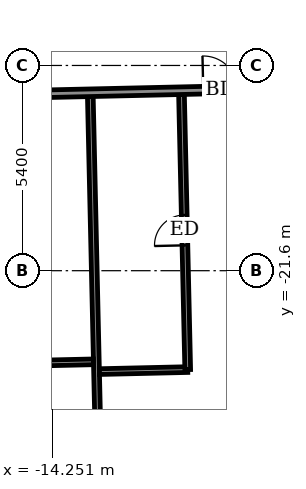
"""IFC4 building model, lengths in metres.
Left out: names, types, materials, properties, quantities, classifications, styles, units other than length and angle.
Written with IfcOpenShell. Run it as: python <this file> out.ifc"""

import sys

from ifc_helpers import new_model, si_unit, direction, frame, frame_2d, origin, place, context, subcontext, project, spatial, rectangle, extrude, element, fill, save


model = new_model("IFC4")
c1 = context("Model", 3, precision=1e-05, world=origin(), true_north=direction((0.0, 1.0)))
c2 = subcontext(c1, "Body", "Model", "MODEL_VIEW")
j1 = project(units=[si_unit("LENGTHUNIT", "METRE"), si_unit("PLANEANGLEUNIT", "RADIAN")], contexts=[c1])
p1 = place(None, origin())
s1 = spatial("IfcSite", under=j1, at=p1, CompositionType="ELEMENT")
p2 = place(p1, origin())
s2 = spatial("IfcBuilding", under=s1, at=p2, CompositionType="ELEMENT")
p3 = place(p2, frame((0.0, 0.0, 41.3)))
s3 = spatial("IfcBuildingStorey", under=s2, at=p3, CompositionType="ELEMENT", Elevation=41.3)
p4 = place(p3, frame((-12.973, -29.415, 0.0), z_axis=(0.0, 0.0, 1.0), x_axis=(-0.022661475803, 0.999743195783, 0.0)))
e1 = element("IfcWall", 1, at=p4, inside=s3, PredefinedType="PARTITIONING", context=c2, shape_type="SweptSolid", body=[
    extrude(rectangle(XDim=12.4, YDim=0.15, at=frame_2d((6.2, 0.0))), origin(), (0.0, 0.0, 1.0), 3.05),
])
p5 = place(p3, frame((-13.015, -24.255, 0.0), z_axis=(0.0, 0.0, 1.0), x_axis=(0.999740260747, 0.02279059109, 0.0)))
e2 = element("IfcWall", 2, at=p5, inside=s3, PredefinedType="PARTITIONING", context=c2, shape_type="SweptSolid", body=[
    extrude(rectangle(XDim=2.324, YDim=0.15, at=frame_2d((1.162, 0.0))), origin(), (0.0, 0.0, 1.0), 3.05),
])
p6 = place(p3, frame((-10.691, -24.202, 0.0), z_axis=(0.0, 0.0, 1.0), x_axis=(-0.022661655024, 0.999743191721, 0.0)))
e3 = element("IfcWall", 3, at=p6, inside=s3, PredefinedType="PARTITIONING", context=c2, shape_type="SweptSolid", body=[
    extrude(rectangle(XDim=7.24, YDim=0.15, at=frame_2d((3.62, 0.0))), origin(), (0.0, 0.0, 1.0), 3.05),
])
p7 = place(p6, frame((3.27, 0.0, 0.0)))
e4 = element("IfcOpeningElement", 4, at=p7, cuts=e3, PredefinedType="OPENING", context=c2, shape_type="SweptSolid", body=[
    extrude(rectangle(XDim=0.8, YDim=2.1, at=frame_2d((0.4, 1.05))), frame((0.0, 0.085, 0.0), z_axis=(0.0, -1.0, 0.0), x_axis=(1.0, 0.0, 0.0)), (0.0, 0.0, 1.0), 0.17),
])
p8 = place(p3, frame((-15.495, -24.051, 0.0), z_axis=(0.0, 0.0, 1.0), x_axis=(0.99974031529, 0.022788198363, 0.0)))
e5 = element("IfcWall", 5, at=p8, inside=s3, PredefinedType="PARTITIONING", context=c2, shape_type="SweptSolid", body=[
    extrude(rectangle(XDim=2.325, YDim=0.15, at=frame_2d((1.162, 0.0))), origin(), (0.0, 0.0, 1.0), 3.05),
])
p9 = place(p3, frame((-30.652, -17.313, 0.0), z_axis=(0.0, 0.0, 1.0), x_axis=(0.999742623764, 0.02268669719, 0.0)))
e6 = element("IfcWall", 6, at=p9, inside=s3, PredefinedType="PARTITIONING", context=c2, shape_type="SweptSolid", body=[
    extrude(rectangle(XDim=58.8, YDim=0.2, at=frame_2d((29.4, 0.0))), origin(), (0.0, 0.0, 1.0), 3.05),
])
p10 = place(p9, frame((3.406, 0.0, 0.0)))
e7 = element("IfcOpeningElement", 7, at=p10, cuts=e6, PredefinedType="OPENING", context=c2, shape_type="SweptSolid", body=[
    extrude(rectangle(XDim=1.0, YDim=2.1, at=frame_2d((0.5, 1.05))), frame((0.0, 0.11, 0.0), z_axis=(0.0, -1.0, 0.0), x_axis=(1.0, 0.0, 0.0)), (0.0, 0.0, 1.0), 0.22),
])
p11 = place(p9, frame((11.475, 0.0, 0.0)))
e8 = element("IfcOpeningElement", 8, at=p11, cuts=e6, PredefinedType="OPENING", context=c2, shape_type="SweptSolid", body=[
    extrude(rectangle(XDim=0.9, YDim=2.1, at=frame_2d((0.45, 1.05))), frame((0.0, 0.11, 0.0), z_axis=(0.0, -1.0, 0.0), x_axis=(1.0, 0.0, 0.0)), (0.0, 0.0, 1.0), 0.22),
])
p12 = place(p9, frame((13.55, 0.0, 0.0)))
e9 = element("IfcOpeningElement", 9, at=p12, cuts=e6, PredefinedType="OPENING", context=c2, shape_type="SweptSolid", body=[
    extrude(rectangle(XDim=0.9, YDim=2.1, at=frame_2d((0.45, 1.05))), frame((0.0, 0.11, 0.0), z_axis=(0.0, -1.0, 0.0), x_axis=(1.0, 0.0, 0.0)), (0.0, 0.0, 1.0), 0.22),
])
p13 = place(p9, frame((20.375, 0.0, 0.0)))
e10 = element("IfcOpeningElement", 10, at=p13, cuts=e6, PredefinedType="OPENING", context=c2, shape_type="SweptSolid", body=[
    extrude(rectangle(XDim=0.9, YDim=2.1, at=frame_2d((0.45, 1.05))), frame((0.0, 0.11, 0.0), z_axis=(0.0, -1.0, 0.0), x_axis=(1.0, 0.0, 0.0)), (0.0, 0.0, 1.0), 0.22),
])
p14 = place(p9, frame((22.625, 0.0, 0.0)))
e11 = element("IfcOpeningElement", 11, at=p14, cuts=e6, PredefinedType="OPENING", context=c2, shape_type="SweptSolid", body=[
    extrude(rectangle(XDim=0.9, YDim=2.1, at=frame_2d((0.45, 1.05))), frame((0.0, 0.11, 0.0), z_axis=(0.0, -1.0, 0.0), x_axis=(1.0, 0.0, 0.0)), (0.0, 0.0, 1.0), 0.22),
])
p15 = place(p9, frame((29.65, 0.0, 0.0)))
e12 = element("IfcOpeningElement", 12, at=p15, cuts=e6, PredefinedType="OPENING", context=c2, shape_type="SweptSolid", body=[
    extrude(rectangle(XDim=0.9, YDim=2.1, at=frame_2d((0.45, 1.05))), frame((0.0, 0.11, 0.0), z_axis=(0.0, -1.0, 0.0), x_axis=(1.0, 0.0, 0.0)), (0.0, 0.0, 1.0), 0.22),
])
p16 = place(p9, frame((31.875, 0.0, 0.0)))
e13 = element("IfcOpeningElement", 13, at=p16, cuts=e6, PredefinedType="OPENING", context=c2, shape_type="SweptSolid", body=[
    extrude(rectangle(XDim=0.9, YDim=2.1, at=frame_2d((0.45, 1.05))), frame((0.0, 0.11, 0.0), z_axis=(0.0, -1.0, 0.0), x_axis=(1.0, 0.0, 0.0)), (0.0, 0.0, 1.0), 0.22),
])
p17 = place(p9, frame((38.9, 0.0, 0.0)))
e14 = element("IfcOpeningElement", 14, at=p17, cuts=e6, PredefinedType="OPENING", context=c2, shape_type="SweptSolid", body=[
    extrude(rectangle(XDim=0.9, YDim=2.1, at=frame_2d((0.45, 1.05))), frame((0.0, 0.11, 0.0), z_axis=(0.0, -1.0, 0.0), x_axis=(1.0, 0.0, 0.0)), (0.0, 0.0, 1.0), 0.22),
])
p18 = place(p9, frame((41.025, 0.0, 0.0)))
e15 = element("IfcOpeningElement", 15, at=p18, cuts=e6, PredefinedType="OPENING", context=c2, shape_type="SweptSolid", body=[
    extrude(rectangle(XDim=0.9, YDim=2.1, at=frame_2d((0.45, 1.05))), frame((0.0, 0.11, 0.0), z_axis=(0.0, -1.0, 0.0), x_axis=(1.0, 0.0, 0.0)), (0.0, 0.0, 1.0), 0.22),
])
p19 = place(p9, frame((47.95, 0.0, 0.0)))
e16 = element("IfcOpeningElement", 16, at=p19, cuts=e6, PredefinedType="OPENING", context=c2, shape_type="SweptSolid", body=[
    extrude(rectangle(XDim=0.9, YDim=2.1, at=frame_2d((0.45, 1.05))), frame((0.0, 0.11, 0.0), z_axis=(0.0, -1.0, 0.0), x_axis=(1.0, 0.0, 0.0)), (0.0, 0.0, 1.0), 0.22),
])
p20 = place(p9, frame((55.6, 0.0, 0.0)))
e17 = element("IfcOpeningElement", 17, at=p20, cuts=e6, PredefinedType="OPENING", context=c2, shape_type="SweptSolid", body=[
    extrude(rectangle(XDim=1.0, YDim=2.1, at=frame_2d((0.5, 1.05))), frame((0.0, 0.11, 0.0), z_axis=(0.0, -1.0, 0.0), x_axis=(1.0, 0.0, 0.0)), (0.0, 0.0, 1.0), 0.22),
])
p21 = place(p9, frame((50.25, 0.0, 0.0)))
e18 = element("IfcOpeningElement", 18, at=p21, cuts=e6, PredefinedType="OPENING", context=c2, shape_type="SweptSolid", body=[
    extrude(rectangle(XDim=0.9, YDim=2.1, at=frame_2d((0.45, 1.05))), frame((0.0, 0.11, 0.0), z_axis=(0.0, -1.0, 0.0), x_axis=(1.0, 0.0, 0.0)), (0.0, 0.0, 1.0), 0.22),
])
p22 = place(p13, origin())
e19 = element("IfcDoor", 19, at=p22, inside=s3, OperationType="SINGLE_SWING_LEFT", PredefinedType="DOOR", context=c2, shape_type="SweptSolid", body=[
    extrude(rectangle(XDim=0.9, YDim=2.1, at=frame_2d((0.45, 1.05))), frame((0.0, 0.025, 0.0), z_axis=(0.0, -1.0, 0.0), x_axis=(1.0, 0.0, 0.0)), (0.0, 0.0, 1.0), 0.05),
])
fill(e10, e19)
p23 = place(p7, origin())
e20 = element("IfcDoor", 20, at=p23, inside=s3, OperationType="SINGLE_SWING_LEFT", PredefinedType="DOOR", context=c2, shape_type="SweptSolid", body=[
    extrude(rectangle(XDim=0.8, YDim=2.1, at=frame_2d((0.4, 1.05))), frame((0.0, 0.025, 0.0), z_axis=(0.0, -1.0, 0.0), x_axis=(1.0, 0.0, 0.0)), (0.0, 0.0, 1.0), 0.05),
])
fill(e4, e20)
save(model, sys.argv[1])
